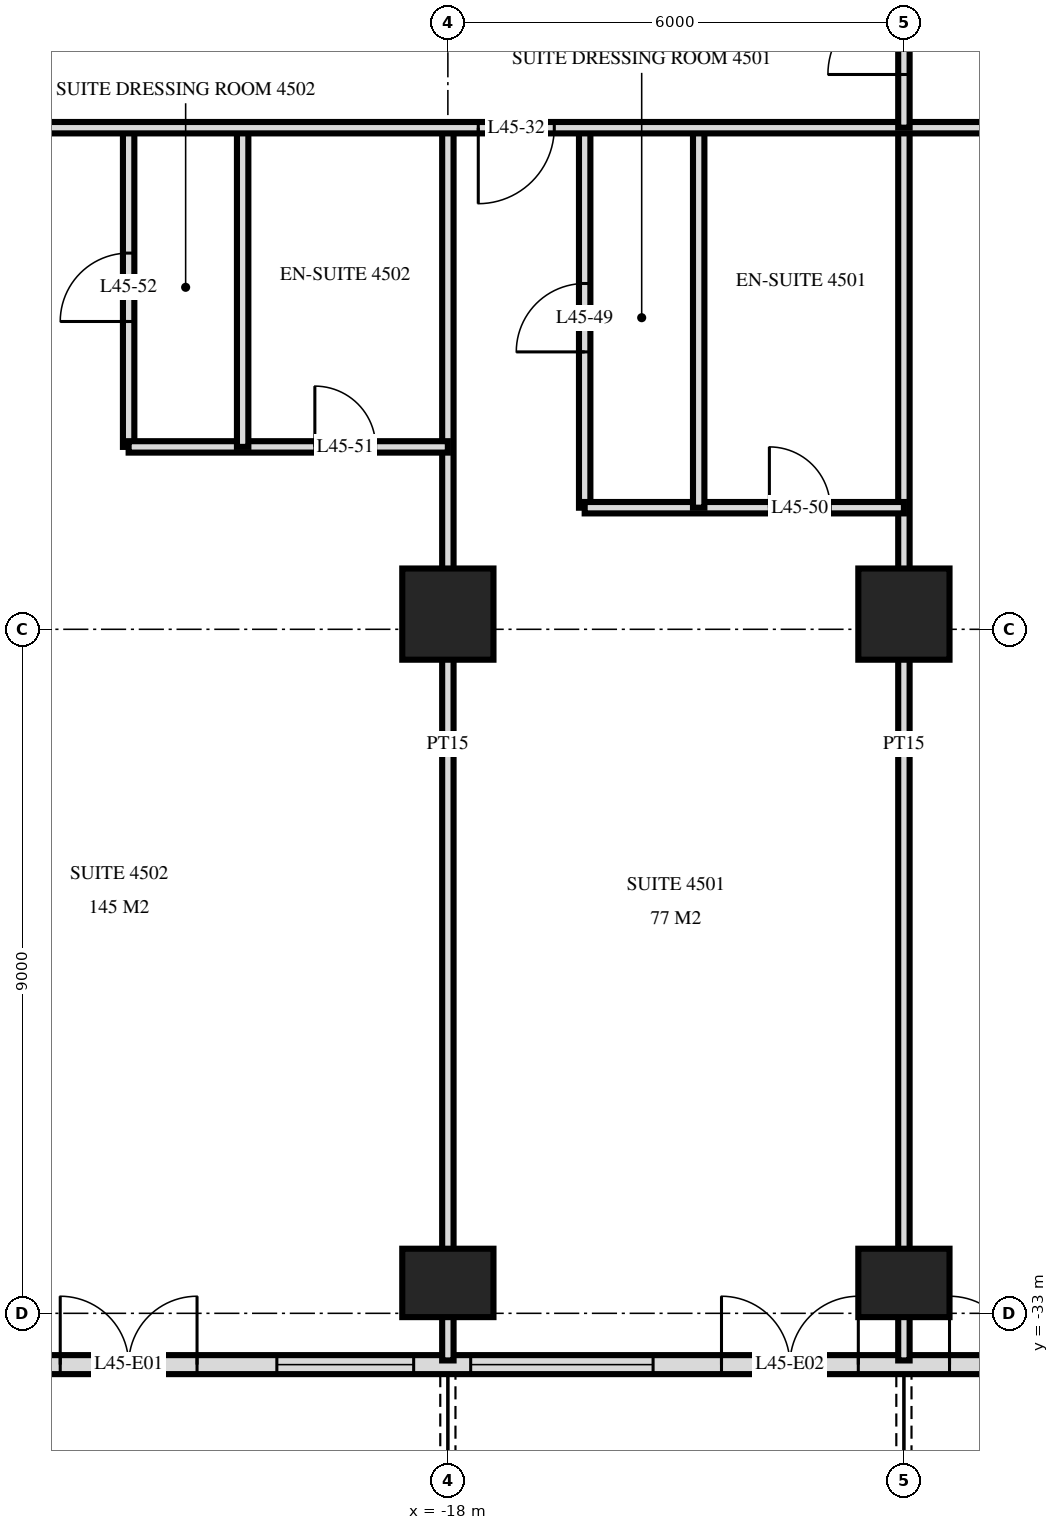
"""IFC4 building model, lengths in metres.
Left out: names, types, materials, properties, quantities, classifications, styles, units other than length and angle.
Written with IfcOpenShell. Run it as: python <this file> out.ifc"""

import sys

from ifc_helpers import new_model, si_unit, direction, frame, frame_2d, origin, origin_2d, place, context, subcontext, project, spatial, rectangle, extrude, element, fill, save


model = new_model("IFC4")
c1 = context("Model", 3, precision=1e-05, world=origin(), true_north=direction((0.0, 1.0)))
c2 = subcontext(c1, "Body", "Model", "MODEL_VIEW")
j1 = project(units=[si_unit("LENGTHUNIT", "METRE"), si_unit("PLANEANGLEUNIT", "RADIAN")], contexts=[c1])
p1 = place(None, origin())
s1 = spatial("IfcSite", under=j1, at=p1, CompositionType="ELEMENT")
p2 = place(p1, origin())
s2 = spatial("IfcBuilding", under=s1, at=p2, CompositionType="ELEMENT")
p3 = place(p2, frame((0.0, 0.0, 174.0)))
s3 = spatial("IfcBuildingStorey", under=s2, at=p3, CompositionType="ELEMENT", Elevation=174.0)
p4 = place(p3, frame((-18.0, -32.6, 0.0), z_axis=(0.0, 0.0, 1.0), x_axis=(1.0, 0.0, 0.0)))
e1 = element("IfcColumn", 1, at=p4, inside=s3, PredefinedType="COLUMN", context=c2, shape_type="SweptSolid", body=[
    extrude(rectangle(XDim=1.2, YDim=0.9, at=origin_2d()), origin(), (0.0, 0.0, 1.0), 3.6),
])
p5 = place(p3, frame((-18.0, -23.8, 0.0), z_axis=(0.0, 0.0, 1.0), x_axis=(1.0, 0.0, 0.0)))
e2 = element("IfcColumn", 2, at=p5, inside=s3, PredefinedType="COLUMN", context=c2, shape_type="SweptSolid", body=[
    extrude(rectangle(XDim=1.2, YDim=1.2, at=origin_2d()), origin(), (0.0, 0.0, 1.0), 3.6),
])
p6 = place(p3, frame((-12.0, -32.6, 0.0), z_axis=(0.0, 0.0, 1.0), x_axis=(1.0, 0.0, 0.0)))
e3 = element("IfcColumn", 3, at=p6, inside=s3, PredefinedType="COLUMN", context=c2, shape_type="SweptSolid", body=[
    extrude(rectangle(XDim=1.2, YDim=0.9, at=origin_2d()), origin(), (0.0, 0.0, 1.0), 3.6),
])
p7 = place(p3, frame((-12.0, -23.8, 0.0), z_axis=(0.0, 0.0, 1.0), x_axis=(1.0, 0.0, 0.0)))
e4 = element("IfcColumn", 4, at=p7, inside=s3, PredefinedType="COLUMN", context=c2, shape_type="SweptSolid", body=[
    extrude(rectangle(XDim=1.2, YDim=1.2, at=origin_2d()), origin(), (0.0, 0.0, 1.0), 3.6),
])
p8 = place(p3, frame((-23.675, -33.675, 0.0), z_axis=(0.0, 0.0, 1.0), x_axis=(1.0, 0.0, 0.0)))
e5 = element("IfcWall", 5, at=p8, inside=s3, PredefinedType="SOLIDWALL", context=c2, shape_type="SweptSolid", body=[
    extrude(rectangle(XDim=47.351, YDim=0.25, at=frame_2d((23.675, 0.0))), origin(), (0.0, 0.0, 1.0), 3.3),
])
p9 = place(p8, frame((0.575, 0.0, 0.0)))
e6 = element("IfcOpeningElement", 6, at=p9, cuts=e5, PredefinedType="OPENING", context=c2, shape_type="SweptSolid", body=[
    extrude(rectangle(XDim=1.8, YDim=2.4, at=frame_2d((0.9, 1.2))), frame((0.0, 0.135, 0.0), z_axis=(0.0, -1.0, 0.0), x_axis=(1.0, 0.0, 0.0)), (0.0, 0.0, 1.0), 0.27),
])
p10 = place(p8, frame((3.425, 0.0, 0.3)))
e7 = element("IfcOpeningElement", 7, at=p10, cuts=e5, PredefinedType="OPENING", context=c2, shape_type="SweptSolid", body=[
    extrude(rectangle(XDim=1.8, YDim=2.1, at=frame_2d((0.9, 1.05))), frame((0.0, 0.135, 0.0), z_axis=(0.0, -1.0, 0.0), x_axis=(1.0, 0.0, 0.0)), (0.0, 0.0, 1.0), 0.27),
])
p11 = place(p8, frame((5.975, 0.0, 0.3)))
e8 = element("IfcOpeningElement", 8, at=p11, cuts=e5, PredefinedType="OPENING", context=c2, shape_type="SweptSolid", body=[
    extrude(rectangle(XDim=2.4, YDim=2.1, at=frame_2d((1.2, 1.05))), frame((0.0, 0.135, 0.0), z_axis=(0.0, -1.0, 0.0), x_axis=(1.0, 0.0, 0.0)), (0.0, 0.0, 1.0), 0.27),
])
p12 = place(p8, frame((9.275, 0.0, 0.0)))
e9 = element("IfcOpeningElement", 9, at=p12, cuts=e5, PredefinedType="OPENING", context=c2, shape_type="SweptSolid", body=[
    extrude(rectangle(XDim=1.8, YDim=2.4, at=frame_2d((0.9, 1.2))), frame((0.0, 0.135, 0.0), z_axis=(0.0, -1.0, 0.0), x_axis=(1.0, 0.0, 0.0)), (0.0, 0.0, 1.0), 0.27),
])
p13 = place(p8, frame((12.275, 0.0, 0.0)))
e10 = element("IfcOpeningElement", 10, at=p13, cuts=e5, PredefinedType="OPENING", context=c2, shape_type="SweptSolid", body=[
    extrude(rectangle(XDim=1.8, YDim=2.4, at=frame_2d((0.9, 1.2))), frame((0.0, 0.135, 0.0), z_axis=(0.0, -1.0, 0.0), x_axis=(1.0, 0.0, 0.0)), (0.0, 0.0, 1.0), 0.27),
])
p14 = place(p8, frame((14.975, 0.0, 0.3)))
e11 = element("IfcOpeningElement", 11, at=p14, cuts=e5, PredefinedType="OPENING", context=c2, shape_type="SweptSolid", body=[
    extrude(rectangle(XDim=2.4, YDim=2.1, at=frame_2d((1.2, 1.05))), frame((0.0, 0.135, 0.0), z_axis=(0.0, -1.0, 0.0), x_axis=(1.0, 0.0, 0.0)), (0.0, 0.0, 1.0), 0.27),
])
p15 = place(p8, frame((17.975, 0.0, 0.3)))
e12 = element("IfcOpeningElement", 12, at=p15, cuts=e5, PredefinedType="OPENING", context=c2, shape_type="SweptSolid", body=[
    extrude(rectangle(XDim=2.4, YDim=2.1, at=frame_2d((1.2, 1.05))), frame((0.0, 0.135, 0.0), z_axis=(0.0, -1.0, 0.0), x_axis=(1.0, 0.0, 0.0)), (0.0, 0.0, 1.0), 0.27),
])
p16 = place(p8, frame((21.275, 0.0, 0.0)))
e13 = element("IfcOpeningElement", 13, at=p16, cuts=e5, PredefinedType="OPENING", context=c2, shape_type="SweptSolid", body=[
    extrude(rectangle(XDim=1.8, YDim=2.4, at=frame_2d((0.9, 1.2))), frame((0.0, 0.135, 0.0), z_axis=(0.0, -1.0, 0.0), x_axis=(1.0, 0.0, 0.0)), (0.0, 0.0, 1.0), 0.27),
])
p17 = place(p8, frame((24.275, 0.0, 0.0)))
e14 = element("IfcOpeningElement", 14, at=p17, cuts=e5, PredefinedType="OPENING", context=c2, shape_type="SweptSolid", body=[
    extrude(rectangle(XDim=1.8, YDim=2.4, at=frame_2d((0.9, 1.2))), frame((0.0, 0.135, 0.0), z_axis=(0.0, -1.0, 0.0), x_axis=(1.0, 0.0, 0.0)), (0.0, 0.0, 1.0), 0.27),
])
p18 = place(p8, frame((26.975, 0.0, 0.3)))
e15 = element("IfcOpeningElement", 15, at=p18, cuts=e5, PredefinedType="OPENING", context=c2, shape_type="SweptSolid", body=[
    extrude(rectangle(XDim=2.4, YDim=2.1, at=frame_2d((1.2, 1.05))), frame((0.0, 0.135, 0.0), z_axis=(0.0, -1.0, 0.0), x_axis=(1.0, 0.0, 0.0)), (0.0, 0.0, 1.0), 0.27),
])
p19 = place(p8, frame((30.275, 0.0, 0.0)))
e16 = element("IfcOpeningElement", 16, at=p19, cuts=e5, PredefinedType="OPENING", context=c2, shape_type="SweptSolid", body=[
    extrude(rectangle(XDim=1.8, YDim=2.4, at=frame_2d((0.9, 1.2))), frame((0.0, 0.135, 0.0), z_axis=(0.0, -1.0, 0.0), x_axis=(1.0, 0.0, 0.0)), (0.0, 0.0, 1.0), 0.27),
])
p20 = place(p8, frame((32.975, 0.0, 0.3)))
e17 = element("IfcOpeningElement", 17, at=p20, cuts=e5, PredefinedType="OPENING", context=c2, shape_type="SweptSolid", body=[
    extrude(rectangle(XDim=2.4, YDim=2.1, at=frame_2d((1.2, 1.05))), frame((0.0, 0.135, 0.0), z_axis=(0.0, -1.0, 0.0), x_axis=(1.0, 0.0, 0.0)), (0.0, 0.0, 1.0), 0.27),
])
p21 = place(p8, frame((35.975, 0.0, 0.3)))
e18 = element("IfcOpeningElement", 18, at=p21, cuts=e5, PredefinedType="OPENING", context=c2, shape_type="SweptSolid", body=[
    extrude(rectangle(XDim=2.4, YDim=2.1, at=frame_2d((1.2, 1.05))), frame((0.0, 0.135, 0.0), z_axis=(0.0, -1.0, 0.0), x_axis=(1.0, 0.0, 0.0)), (0.0, 0.0, 1.0), 0.27),
])
p22 = place(p8, frame((39.275, 0.0, 0.0)))
e19 = element("IfcOpeningElement", 19, at=p22, cuts=e5, PredefinedType="OPENING", context=c2, shape_type="SweptSolid", body=[
    extrude(rectangle(XDim=1.8, YDim=2.4, at=frame_2d((0.9, 1.2))), frame((0.0, 0.135, 0.0), z_axis=(0.0, -1.0, 0.0), x_axis=(1.0, 0.0, 0.0)), (0.0, 0.0, 1.0), 0.27),
])
p23 = place(p8, frame((42.275, 0.0, 0.0)))
e20 = element("IfcOpeningElement", 20, at=p23, cuts=e5, PredefinedType="OPENING", context=c2, shape_type="SweptSolid", body=[
    extrude(rectangle(XDim=1.8, YDim=2.4, at=frame_2d((0.9, 1.2))), frame((0.0, 0.135, 0.0), z_axis=(0.0, -1.0, 0.0), x_axis=(1.0, 0.0, 0.0)), (0.0, 0.0, 1.0), 0.27),
])
p24 = place(p8, frame((45.125, 0.0, 0.3)))
e21 = element("IfcOpeningElement", 21, at=p24, cuts=e5, PredefinedType="OPENING", context=c2, shape_type="SweptSolid", body=[
    extrude(rectangle(XDim=1.8, YDim=2.1, at=frame_2d((0.9, 1.05))), frame((0.0, 0.135, 0.0), z_axis=(0.0, -1.0, 0.0), x_axis=(1.0, 0.0, 0.0)), (0.0, 0.0, 1.0), 0.27),
])
p25 = place(p3, frame((-12.0, -17.4, 0.0), z_axis=(0.0, 0.0, 1.0), x_axis=(0.0, 1.0, 0.0)))
e22 = element("IfcWall", 22, at=p25, inside=s3, PredefinedType="PARTITIONING", context=c2, shape_type="SweptSolid", body=[
    extrude(rectangle(XDim=2.35, YDim=0.15, at=frame_2d((1.175, 0.0))), origin(), (0.0, 0.0, 1.0), 3.32),
])
p26 = place(p25, frame((0.7, 0.0, 0.0)))
e23 = element("IfcOpeningElement", 23, at=p26, cuts=e22, PredefinedType="OPENING", context=c2, shape_type="SweptSolid", body=[
    extrude(rectangle(XDim=1.0, YDim=2.1, at=frame_2d((0.5, 1.05))), frame((0.0, 0.085, 0.0), z_axis=(0.0, -1.0, 0.0), x_axis=(1.0, 0.0, 0.0)), (0.0, 0.0, 1.0), 0.17),
])
p27 = place(p3, frame((-12.0, -33.62, 0.0), z_axis=(0.0, 0.0, 1.0), x_axis=(0.0, 1.0, 0.0)))
e24 = element("IfcWall", 24, at=p27, inside=s3, PredefinedType="PARTITIONING", context=c2, shape_type="SweptSolid", body=[
    extrude(rectangle(XDim=16.22, YDim=0.15, at=frame_2d((8.11, 0.0))), origin(), (0.0, 0.0, 1.0), 3.32),
])
p28 = place(p3, frame((-14.7, -22.4, 0.0), z_axis=(0.0, 0.0, 1.0), x_axis=(0.0, 1.0, 0.0)))
e25 = element("IfcWall", 25, at=p28, inside=s3, PredefinedType="PARTITIONING", context=c2, shape_type="SweptSolid", body=[
    extrude(rectangle(XDim=5.0, YDim=0.15, at=frame_2d((2.5, 0.0))), origin(), (0.0, 0.0, 1.0), 3.32),
])
p29 = place(p3, frame((-16.2, -22.4, 0.0), z_axis=(0.0, 0.0, 1.0), x_axis=(0.0, 1.0, 0.0)))
e26 = element("IfcWall", 26, at=p29, inside=s3, PredefinedType="PARTITIONING", context=c2, shape_type="SweptSolid", body=[
    extrude(rectangle(XDim=5.0, YDim=0.15, at=frame_2d((2.5, 0.0))), origin(), (0.0, 0.0, 1.0), 3.32),
])
p30 = place(p29, frame((2.05, 0.0, 0.0)))
e27 = element("IfcOpeningElement", 27, at=p30, cuts=e26, PredefinedType="OPENING", context=c2, shape_type="SweptSolid", body=[
    extrude(rectangle(XDim=0.9, YDim=2.1, at=frame_2d((0.45, 1.05))), frame((0.0, 0.085, 0.0), z_axis=(0.0, -1.0, 0.0), x_axis=(1.0, 0.0, 0.0)), (0.0, 0.0, 1.0), 0.17),
])
p31 = place(p3, frame((-18.0, -33.62, 0.0), z_axis=(0.0, 0.0, 1.0), x_axis=(0.0, 1.0, 0.0)))
e28 = element("IfcWall", 28, at=p31, inside=s3, PredefinedType="PARTITIONING", context=c2, shape_type="SweptSolid", body=[
    extrude(rectangle(XDim=16.22, YDim=0.15, at=frame_2d((8.11, 0.0))), origin(), (0.0, 0.0, 1.0), 3.32),
])
p32 = place(p3, frame((-20.7, -21.6, 0.0), z_axis=(0.0, 0.0, 1.0), x_axis=(0.0, 1.0, 0.0)))
e29 = element("IfcWall", 29, at=p32, inside=s3, PredefinedType="PARTITIONING", context=c2, shape_type="SweptSolid", body=[
    extrude(rectangle(XDim=4.2, YDim=0.15, at=frame_2d((2.1, 0.0))), origin(), (0.0, 0.0, 1.0), 3.32),
])
p33 = place(p3, frame((-22.2, -21.6, 0.0), z_axis=(0.0, 0.0, 1.0), x_axis=(0.0, 1.0, 0.0)))
e30 = element("IfcWall", 30, at=p33, inside=s3, PredefinedType="PARTITIONING", context=c2, shape_type="SweptSolid", body=[
    extrude(rectangle(XDim=4.2, YDim=0.15, at=frame_2d((2.1, 0.0))), origin(), (0.0, 0.0, 1.0), 3.32),
])
p34 = place(p33, frame((1.65, 0.0, 0.0)))
e31 = element("IfcOpeningElement", 31, at=p34, cuts=e30, PredefinedType="OPENING", context=c2, shape_type="SweptSolid", body=[
    extrude(rectangle(XDim=0.9, YDim=2.1, at=frame_2d((0.45, 1.05))), frame((0.0, 0.085, 0.0), z_axis=(0.0, -1.0, 0.0), x_axis=(1.0, 0.0, 0.0)), (0.0, 0.0, 1.0), 0.17),
])
p35 = place(p3, frame((-16.2, -22.4, 0.0), z_axis=(0.0, 0.0, 1.0), x_axis=(1.0, 0.0, 0.0)))
e32 = element("IfcWall", 32, at=p35, inside=s3, PredefinedType="PARTITIONING", context=c2, shape_type="SweptSolid", body=[
    extrude(rectangle(XDim=4.2, YDim=0.15, at=frame_2d((2.1, 0.0))), origin(), (0.0, 0.0, 1.0), 3.32),
])
p36 = place(p35, frame((2.43, 0.0, 0.0)))
e33 = element("IfcOpeningElement", 33, at=p36, cuts=e32, PredefinedType="OPENING", context=c2, shape_type="SweptSolid", body=[
    extrude(rectangle(XDim=0.8, YDim=2.1, at=frame_2d((0.4, 1.05))), frame((0.0, 0.085, 0.0), z_axis=(0.0, -1.0, 0.0), x_axis=(1.0, 0.0, 0.0)), (0.0, 0.0, 1.0), 0.17),
])
p37 = place(p3, frame((-22.2, -21.6, 0.0), z_axis=(0.0, 0.0, 1.0), x_axis=(1.0, 0.0, 0.0)))
e34 = element("IfcWall", 34, at=p37, inside=s3, PredefinedType="PARTITIONING", context=c2, shape_type="SweptSolid", body=[
    extrude(rectangle(XDim=4.2, YDim=0.15, at=frame_2d((2.1, 0.0))), origin(), (0.0, 0.0, 1.0), 3.32),
])
p38 = place(p37, frame((2.45, 0.0, 0.0)))
e35 = element("IfcOpeningElement", 35, at=p38, cuts=e34, PredefinedType="OPENING", context=c2, shape_type="SweptSolid", body=[
    extrude(rectangle(XDim=0.8, YDim=2.1, at=frame_2d((0.4, 1.05))), frame((0.0, 0.085, 0.0), z_axis=(0.0, -1.0, 0.0), x_axis=(1.0, 0.0, 0.0)), (0.0, 0.0, 1.0), 0.17),
])
p39 = place(p3, frame((-28.02, -17.4, 0.0), z_axis=(0.0, 0.0, 1.0), x_axis=(1.0, 0.0, 0.0)))
e36 = element("IfcWall", 36, at=p39, inside=s3, PredefinedType="PARTITIONING", context=c2, shape_type="SweptSolid", body=[
    extrude(rectangle(XDim=56.04, YDim=0.15, at=frame_2d((28.02, 0.0))), origin(), (0.0, 0.0, 1.0), 3.32),
])
p40 = place(p39, frame((10.42, 0.0, 0.0)))
e37 = element("IfcOpeningElement", 37, at=p40, cuts=e36, PredefinedType="OPENING", context=c2, shape_type="SweptSolid", body=[
    extrude(rectangle(XDim=1.0, YDim=2.1, at=frame_2d((0.5, 1.05))), frame((0.0, 0.085, 0.0), z_axis=(0.0, -1.0, 0.0), x_axis=(1.0, 0.0, 0.0)), (0.0, 0.0, 1.0), 0.17),
])
p41 = place(p39, frame((2.32, 0.0, 0.0)))
e38 = element("IfcOpeningElement", 38, at=p41, cuts=e36, PredefinedType="OPENING", context=c2, shape_type="SweptSolid", body=[
    extrude(rectangle(XDim=1.0, YDim=2.1, at=frame_2d((0.5, 1.05))), frame((0.0, 0.085, 0.0), z_axis=(0.0, -1.0, 0.0), x_axis=(1.0, 0.0, 0.0)), (0.0, 0.0, 1.0), 0.17),
])
p42 = place(p39, frame((49.72, 0.0, 0.0)))
e39 = element("IfcOpeningElement", 39, at=p42, cuts=e36, PredefinedType="OPENING", context=c2, shape_type="SweptSolid", body=[
    extrude(rectangle(XDim=1.0, YDim=2.1, at=frame_2d((0.5, 1.05))), frame((0.0, 0.085, 0.0), z_axis=(0.0, -1.0, 0.0), x_axis=(1.0, 0.0, 0.0)), (0.0, 0.0, 1.0), 0.17),
])
p43 = place(p39, frame((23.02, 0.0, 0.0)))
e40 = element("IfcOpeningElement", 40, at=p43, cuts=e36, PredefinedType="OPENING", context=c2, shape_type="SweptSolid", body=[
    extrude(rectangle(XDim=1.0, YDim=2.1, at=frame_2d((0.5, 1.05))), frame((0.0, 0.085, 0.0), z_axis=(0.0, -1.0, 0.0), x_axis=(1.0, 0.0, 0.0)), (0.0, 0.0, 1.0), 0.17),
])
p44 = place(p39, frame((35.02, 0.0, 0.0)))
e41 = element("IfcOpeningElement", 41, at=p44, cuts=e36, PredefinedType="OPENING", context=c2, shape_type="SweptSolid", body=[
    extrude(rectangle(XDim=1.0, YDim=2.1, at=frame_2d((0.5, 1.05))), frame((0.0, 0.085, 0.0), z_axis=(0.0, -1.0, 0.0), x_axis=(1.0, 0.0, 0.0)), (0.0, 0.0, 1.0), 0.17),
])
p45 = place(p9, origin())
e42 = element("IfcDoor", 42, at=p45, inside=s3, OperationType="DOUBLE_DOOR_SINGLE_SWING", PredefinedType="DOOR", context=c2, shape_type="SweptSolid", body=[
    extrude(rectangle(XDim=1.8, YDim=2.4, at=frame_2d((0.9, 1.2))), frame((0.0, 0.025, 0.0), z_axis=(0.0, -1.0, 0.0), x_axis=(1.0, 0.0, 0.0)), (0.0, 0.0, 1.0), 0.05),
])
fill(e6, e42)
p46 = place(p10, origin())
e43 = element("IfcWindow", 43, at=p46, inside=s3, PartitioningType="SINGLE_PANEL", PredefinedType="WINDOW", context=c2, shape_type="SweptSolid", body=[
    extrude(rectangle(XDim=1.8, YDim=2.1, at=frame_2d((0.9, 1.05))), frame((0.0, 0.03, 0.0), z_axis=(0.0, -1.0, 0.0), x_axis=(1.0, 0.0, 0.0)), (0.0, 0.0, 1.0), 0.06),
])
fill(e7, e43)
p47 = place(p11, origin())
e44 = element("IfcWindow", 44, at=p47, inside=s3, PartitioningType="SINGLE_PANEL", PredefinedType="WINDOW", context=c2, shape_type="SweptSolid", body=[
    extrude(rectangle(XDim=2.4, YDim=2.1, at=frame_2d((1.2, 1.05))), frame((0.0, 0.03, 0.0), z_axis=(0.0, -1.0, 0.0), x_axis=(1.0, 0.0, 0.0)), (0.0, 0.0, 1.0), 0.06),
])
fill(e8, e44)
p48 = place(p12, origin())
e45 = element("IfcDoor", 45, at=p48, inside=s3, OperationType="DOUBLE_DOOR_SINGLE_SWING", PredefinedType="DOOR", context=c2, shape_type="SweptSolid", body=[
    extrude(rectangle(XDim=1.8, YDim=2.4, at=frame_2d((0.9, 1.2))), frame((0.0, 0.025, 0.0), z_axis=(0.0, -1.0, 0.0), x_axis=(1.0, 0.0, 0.0)), (0.0, 0.0, 1.0), 0.05),
])
fill(e9, e45)
p49 = place(p13, origin())
e46 = element("IfcDoor", 46, at=p49, inside=s3, OperationType="DOUBLE_DOOR_SINGLE_SWING", PredefinedType="DOOR", context=c2, shape_type="SweptSolid", body=[
    extrude(rectangle(XDim=1.8, YDim=2.4, at=frame_2d((0.9, 1.2))), frame((0.0, 0.025, 0.0), z_axis=(0.0, -1.0, 0.0), x_axis=(1.0, 0.0, 0.0)), (0.0, 0.0, 1.0), 0.05),
])
fill(e10, e46)
p50 = place(p26, origin())
e47 = element("IfcDoor", 47, at=p50, inside=s3, OperationType="SINGLE_SWING_RIGHT", PredefinedType="DOOR", context=c2, shape_type="SweptSolid", body=[
    extrude(rectangle(XDim=1.0, YDim=2.1, at=frame_2d((0.5, 1.05))), frame((0.0, 0.025, 0.0), z_axis=(0.0, -1.0, 0.0), x_axis=(1.0, 0.0, 0.0)), (0.0, 0.0, 1.0), 0.05),
])
fill(e23, e47)
p51 = place(p40, frame((0.5, 0.0, 0.0), z_axis=(0.0, 0.0, 1.0), x_axis=(-1.0, 0.0, 0.0)))
e48 = element("IfcDoor", 48, at=p51, inside=s3, OperationType="SINGLE_SWING_LEFT", PredefinedType="DOOR", context=c2, shape_type="SweptSolid", body=[
    extrude(rectangle(XDim=1.0, YDim=2.1, at=frame_2d((0.0, 1.05))), frame((0.0, -0.025, 0.0), z_axis=(0.0, 1.0, 0.0), x_axis=(-1.0, 0.0, 0.0)), (0.0, 0.0, 1.0), 0.05),
])
fill(e37, e48)
p52 = place(p30, origin())
e49 = element("IfcDoor", 49, at=p52, inside=s3, OperationType="SINGLE_SWING_RIGHT", PredefinedType="DOOR", context=c2, shape_type="SweptSolid", body=[
    extrude(rectangle(XDim=0.9, YDim=2.1, at=frame_2d((0.45, 1.05))), frame((0.0, 0.025, 0.0), z_axis=(0.0, -1.0, 0.0), x_axis=(1.0, 0.0, 0.0)), (0.0, 0.0, 1.0), 0.05),
])
fill(e27, e49)
p53 = place(p36, origin())
e50 = element("IfcDoor", 50, at=p53, inside=s3, OperationType="SINGLE_SWING_RIGHT", PredefinedType="DOOR", context=c2, shape_type="SweptSolid", body=[
    extrude(rectangle(XDim=0.8, YDim=2.1, at=frame_2d((0.4, 1.05))), frame((0.0, 0.025, 0.0), z_axis=(0.0, -1.0, 0.0), x_axis=(1.0, 0.0, 0.0)), (0.0, 0.0, 1.0), 0.05),
])
fill(e33, e50)
p54 = place(p38, origin())
e51 = element("IfcDoor", 51, at=p54, inside=s3, OperationType="SINGLE_SWING_RIGHT", PredefinedType="DOOR", context=c2, shape_type="SweptSolid", body=[
    extrude(rectangle(XDim=0.8, YDim=2.1, at=frame_2d((0.4, 1.05))), frame((0.0, 0.025, 0.0), z_axis=(0.0, -1.0, 0.0), x_axis=(1.0, 0.0, 0.0)), (0.0, 0.0, 1.0), 0.05),
])
fill(e35, e51)
p55 = place(p34, origin())
e52 = element("IfcDoor", 52, at=p55, inside=s3, OperationType="SINGLE_SWING_RIGHT", PredefinedType="DOOR", context=c2, shape_type="SweptSolid", body=[
    extrude(rectangle(XDim=0.9, YDim=2.1, at=frame_2d((0.45, 1.05))), frame((0.0, 0.025, 0.0), z_axis=(0.0, -1.0, 0.0), x_axis=(1.0, 0.0, 0.0)), (0.0, 0.0, 1.0), 0.05),
])
fill(e31, e52)
save(model, sys.argv[1])
